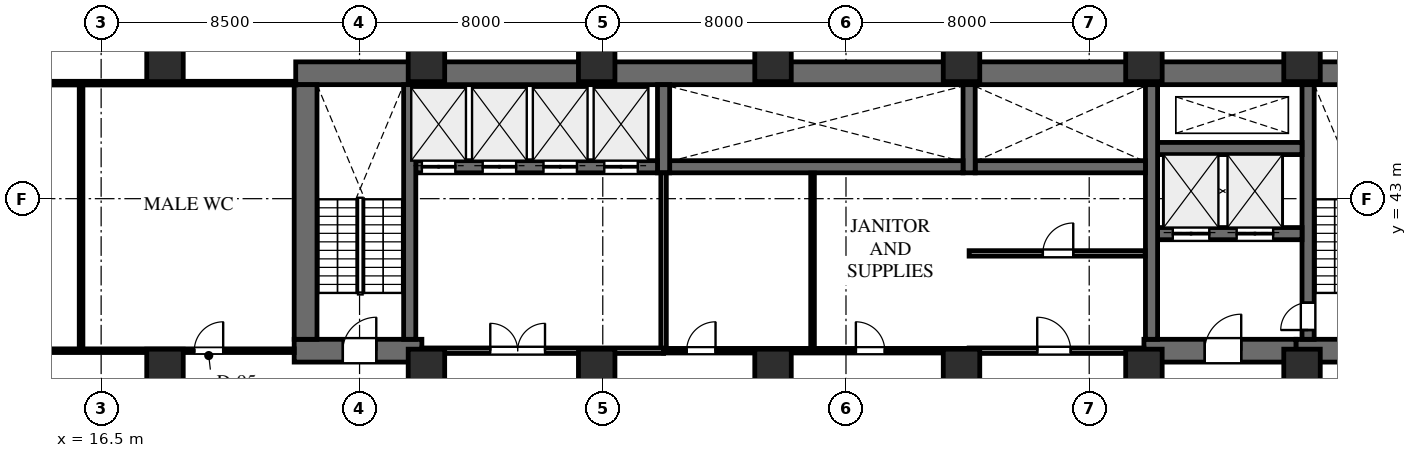
"""IFC4 building model, lengths in metres.
Left out: names, types, materials, properties, quantities, classifications, styles, units other than length and angle.
Written with IfcOpenShell. Run it as: python <this file> out.ifc"""

import sys

from ifc_helpers import new_model, si_unit, direction, frame, frame_2d, origin, origin_2d, place, context, subcontext, project, spatial, rectangle, extrude, element, fill, save


model = new_model("IFC4")
c1 = context("Model", 3, precision=1e-05, world=origin(), true_north=direction((0.0, 1.0)))
c2 = subcontext(c1, "Body", "Model", "MODEL_VIEW")
j1 = project(units=[si_unit("LENGTHUNIT", "METRE"), si_unit("PLANEANGLEUNIT", "RADIAN")], contexts=[c1])
p1 = place(None, origin())
s1 = spatial("IfcSite", under=j1, at=p1, CompositionType="ELEMENT")
p2 = place(p1, origin())
s2 = spatial("IfcBuilding", under=s1, at=p2, CompositionType="ELEMENT")
p3 = place(p2, frame((0.0, 0.0, 61.5)))
s3 = spatial("IfcBuildingStorey", under=s2, at=p3, CompositionType="ELEMENT", Elevation=61.5)
p4 = place(p3, frame((22.9, 47.125, 0.0), z_axis=(0.0, 0.0, 1.0), x_axis=(1.0, 0.0, 0.0)))
e1 = element("IfcWall", 1, at=p4, inside=s3, PredefinedType="SHEAR", context=c2, shape_type="SweptSolid", body=[
    extrude(rectangle(XDim=43.7, YDim=0.75, at=frame_2d((21.85, 0.0))), origin(), (0.0, 0.0, 1.0), 4.0),
])
p5 = place(p3, frame((55.8, 38.0, 0.0), z_axis=(0.0, 0.0, 1.0), x_axis=(1.0, 0.0, 0.0)))
e2 = element("IfcWall", 2, at=p5, inside=s3, PredefinedType="SHEAR", context=c2, shape_type="SweptSolid", body=[
    extrude(rectangle(XDim=10.8, YDim=0.75, at=frame_2d((5.4, 0.0))), origin(), (0.0, 0.0, 1.0), 4.0),
])
p6 = place(p5, frame((1.5, 0.0, 0.0)))
e3 = element("IfcOpeningElement", 3, at=p6, cuts=e2, PredefinedType="OPENING", context=c2, shape_type="SweptSolid", body=[
    extrude(rectangle(XDim=1.1, YDim=2.2, at=frame_2d((0.55, 1.1))), frame((0.0, 0.385, 0.0), z_axis=(0.0, -1.0, 0.0), x_axis=(1.0, 0.0, 0.0)), (0.0, 0.0, 1.0), 0.77),
])
p7 = place(p5, frame((4.82, 0.0, 0.0)))
e4 = element("IfcOpeningElement", 4, at=p7, cuts=e2, PredefinedType="OPENING", context=c2, shape_type="SweptSolid", body=[
    extrude(rectangle(XDim=1.0, YDim=2.15, at=frame_2d((0.5, 1.075))), frame((0.0, 0.385, 0.0), z_axis=(0.0, -1.0, 0.0), x_axis=(1.0, 0.0, 0.0)), (0.0, 0.0, 1.0), 0.77),
])
p8 = place(p5, frame((8.05, 0.0, 0.0)))
e5 = element("IfcOpeningElement", 5, at=p8, cuts=e2, PredefinedType="OPENING", context=c2, shape_type="SweptSolid", body=[
    extrude(rectangle(XDim=1.1, YDim=2.2, at=frame_2d((0.55, 1.1))), frame((0.0, 0.385, 0.0), z_axis=(0.0, -1.0, 0.0), x_axis=(1.0, 0.0, 0.0)), (0.0, 0.0, 1.0), 0.77),
])
p9 = place(p3, frame((56.2, 38.375, 0.0), z_axis=(0.0, 0.0, 1.0), x_axis=(0.0, 1.0, 0.0)))
e6 = element("IfcWall", 6, at=p9, inside=s3, PredefinedType="SHEAR", context=c2, shape_type="SweptSolid", body=[
    extrude(rectangle(XDim=8.375, YDim=0.4, at=frame_2d((4.188, 0.0))), origin(), (0.0, 0.0, 1.0), 4.0),
])
p10 = place(p9, frame((0.305, 0.0, 0.0)))
e7 = element("IfcOpeningElement", 7, at=p10, cuts=e6, PredefinedType="OPENING", context=c2, shape_type="SweptSolid", body=[
    extrude(rectangle(XDim=0.9, YDim=2.15, at=frame_2d((0.45, 1.075))), frame((0.0, 0.21, 0.0), z_axis=(0.0, -1.0, 0.0), x_axis=(1.0, 0.0, 0.0)), (0.0, 0.0, 1.0), 0.42),
])
p11 = place(p3, frame((50.8, 38.0, 0.0), z_axis=(0.0, 0.0, 1.0), x_axis=(1.0, 0.0, 0.0)))
e8 = element("IfcWall", 8, at=p11, inside=s3, PredefinedType="SHEAR", context=c2, shape_type="SweptSolid", body=[
    extrude(rectangle(XDim=5.0, YDim=0.75, at=frame_2d((2.5, 0.0))), origin(), (0.0, 0.0, 1.0), 4.0),
])
p12 = place(p11, frame((2.0, 0.0, 0.0)))
e9 = element("IfcOpeningElement", 9, at=p12, cuts=e8, PredefinedType="OPENING", context=c2, shape_type="SweptSolid", body=[
    extrude(rectangle(XDim=1.2, YDim=2.2, at=frame_2d((0.6, 1.1))), frame((0.0, 0.385, 0.0), z_axis=(0.0, -1.0, 0.0), x_axis=(1.0, 0.0, 0.0)), (0.0, 0.0, 1.0), 0.77),
])
p13 = place(p3, frame((51.25, 41.85, 0.0), z_axis=(0.0, 0.0, 1.0), x_axis=(1.0, 0.0, 0.0)))
e10 = element("IfcWall", 10, at=p13, inside=s3, PredefinedType="SHEAR", context=c2, shape_type="SweptSolid", body=[
    extrude(rectangle(XDim=4.75, YDim=0.4, at=frame_2d((2.375, 0.0))), origin(), (0.0, 0.0, 1.0), 4.0),
])
p14 = place(p13, frame((0.5, 0.0, 0.0)))
e11 = element("IfcOpeningElement", 11, at=p14, cuts=e10, PredefinedType="OPENING", context=c2, shape_type="SweptSolid", body=[
    extrude(rectangle(XDim=1.2, YDim=2.2, at=frame_2d((0.6, 1.1))), frame((0.0, 0.21, 0.0), z_axis=(0.0, -1.0, 0.0), x_axis=(1.0, 0.0, 0.0)), (0.0, 0.0, 1.0), 0.42),
])
p15 = place(p13, frame((2.6, 0.0, 0.0)))
e12 = element("IfcOpeningElement", 12, at=p15, cuts=e10, PredefinedType="OPENING", context=c2, shape_type="SweptSolid", body=[
    extrude(rectangle(XDim=1.2, YDim=2.2, at=frame_2d((0.6, 1.1))), frame((0.0, 0.21, 0.0), z_axis=(0.0, -1.0, 0.0), x_axis=(1.0, 0.0, 0.0)), (0.0, 0.0, 1.0), 0.42),
])
p16 = place(p3, frame((51.25, 44.65, 0.0), z_axis=(0.0, 0.0, 1.0), x_axis=(1.0, 0.0, 0.0)))
e13 = element("IfcWall", 13, at=p16, inside=s3, PredefinedType="SHEAR", context=c2, shape_type="SweptSolid", body=[
    extrude(rectangle(XDim=4.75, YDim=0.4, at=frame_2d((2.375, 0.0))), origin(), (0.0, 0.0, 1.0), 4.0),
])
p17 = place(p3, frame((51.05, 38.375, 0.0), z_axis=(0.0, 0.0, 1.0), x_axis=(0.0, 1.0, 0.0)))
e14 = element("IfcWall", 14, at=p17, inside=s3, PredefinedType="SHEAR", context=c2, shape_type="SweptSolid", body=[
    extrude(rectangle(XDim=8.375, YDim=0.4, at=frame_2d((4.188, 0.0))), origin(), (0.0, 0.0, 1.0), 4.0),
])
p18 = place(p3, frame((45.25, 44.05, 0.0), z_axis=(0.0, 0.0, 1.0), x_axis=(1.0, 0.0, 0.0)))
e15 = element("IfcWall", 15, at=p18, inside=s3, PredefinedType="SHEAR", context=c2, shape_type="SweptSolid", body=[
    extrude(rectangle(XDim=5.6, YDim=0.4, at=frame_2d((2.8, 0.0))), origin(), (0.0, 0.0, 1.0), 4.0),
])
p19 = place(p3, frame((45.05, 43.85, 0.0), z_axis=(0.0, 0.0, 1.0), x_axis=(0.0, 1.0, 0.0)))
e16 = element("IfcWall", 16, at=p19, inside=s3, PredefinedType="SHEAR", context=c2, shape_type="SweptSolid", body=[
    extrude(rectangle(XDim=2.9, YDim=0.4, at=frame_2d((1.45, 0.0))), origin(), (0.0, 0.0, 1.0), 4.0),
])
p20 = place(p3, frame((35.2, 44.05, 0.0), z_axis=(0.0, 0.0, 1.0), x_axis=(1.0, 0.0, 0.0)))
e17 = element("IfcWall", 17, at=p20, inside=s3, PredefinedType="SHEAR", context=c2, shape_type="SweptSolid", body=[
    extrude(rectangle(XDim=9.65, YDim=0.4, at=frame_2d((4.825, 0.0))), origin(), (0.0, 0.0, 1.0), 4.0),
])
p21 = place(p3, frame((35.0, 43.85, 0.0), z_axis=(0.0, 0.0, 1.0), x_axis=(0.0, 1.0, 0.0)))
e18 = element("IfcWall", 18, at=p21, inside=s3, PredefinedType="SHEAR", context=c2, shape_type="SweptSolid", body=[
    extrude(rectangle(XDim=2.9, YDim=0.4, at=frame_2d((1.45, 0.0))), origin(), (0.0, 0.0, 1.0), 4.0),
])
p22 = place(p3, frame((26.85, 44.05, 0.0), z_axis=(0.0, 0.0, 1.0), x_axis=(1.0, 0.0, 0.0)))
e19 = element("IfcWall", 19, at=p22, inside=s3, PredefinedType="SHEAR", context=c2, shape_type="SweptSolid", body=[
    extrude(rectangle(XDim=7.95, YDim=0.4, at=frame_2d((3.975, 0.0))), origin(), (0.0, 0.0, 1.0), 4.0),
])
p23 = place(p22, frame((0.2, 0.0, 0.0)))
e20 = element("IfcOpeningElement", 20, at=p23, cuts=e19, PredefinedType="OPENING", context=c2, shape_type="SweptSolid", body=[
    extrude(rectangle(XDim=1.1, YDim=2.2, at=frame_2d((0.55, 1.1))), frame((0.0, 0.21, 0.0), z_axis=(0.0, -1.0, 0.0), x_axis=(1.0, 0.0, 0.0)), (0.0, 0.0, 1.0), 0.42),
])
p24 = place(p22, frame((2.2, 0.0, 0.0)))
e21 = element("IfcOpeningElement", 21, at=p24, cuts=e19, PredefinedType="OPENING", context=c2, shape_type="SweptSolid", body=[
    extrude(rectangle(XDim=1.1, YDim=2.2, at=frame_2d((0.55, 1.1))), frame((0.0, 0.21, 0.0), z_axis=(0.0, -1.0, 0.0), x_axis=(1.0, 0.0, 0.0)), (0.0, 0.0, 1.0), 0.42),
])
p25 = place(p22, frame((4.2, 0.0, 0.0)))
e22 = element("IfcOpeningElement", 22, at=p25, cuts=e19, PredefinedType="OPENING", context=c2, shape_type="SweptSolid", body=[
    extrude(rectangle(XDim=1.1, YDim=2.2, at=frame_2d((0.55, 1.1))), frame((0.0, 0.21, 0.0), z_axis=(0.0, -1.0, 0.0), x_axis=(1.0, 0.0, 0.0)), (0.0, 0.0, 1.0), 0.42),
])
p26 = place(p22, frame((6.2, 0.0, 0.0)))
e23 = element("IfcOpeningElement", 23, at=p26, cuts=e19, PredefinedType="OPENING", context=c2, shape_type="SweptSolid", body=[
    extrude(rectangle(XDim=1.1, YDim=2.2, at=frame_2d((0.55, 1.1))), frame((0.0, 0.21, 0.0), z_axis=(0.0, -1.0, 0.0), x_axis=(1.0, 0.0, 0.0)), (0.0, 0.0, 1.0), 0.42),
])
p27 = place(p3, frame((22.85, 38.0, 0.0), z_axis=(0.0, 0.0, 1.0), x_axis=(1.0, 0.0, 0.0)))
e24 = element("IfcWall", 24, at=p27, inside=s3, PredefinedType="SHEAR", context=c2, shape_type="SweptSolid", body=[
    extrude(rectangle(XDim=4.2, YDim=0.75, at=frame_2d((2.1, 0.0))), origin(), (0.0, 0.0, 1.0), 4.0),
])
p28 = place(p27, frame((1.6, 0.0, 0.0)))
e25 = element("IfcOpeningElement", 25, at=p28, cuts=e24, PredefinedType="OPENING", context=c2, shape_type="SweptSolid", body=[
    extrude(rectangle(XDim=1.1, YDim=2.2, at=frame_2d((0.55, 1.1))), frame((0.0, 0.385, 0.0), z_axis=(0.0, -1.0, 0.0), x_axis=(1.0, 0.0, 0.0)), (0.0, 0.0, 1.0), 0.77),
])
p29 = place(p3, frame((23.225, 38.375, 0.0), z_axis=(0.0, 0.0, 1.0), x_axis=(0.0, 1.0, 0.0)))
e26 = element("IfcWall", 26, at=p29, inside=s3, PredefinedType="SHEAR", context=c2, shape_type="SweptSolid", body=[
    extrude(rectangle(XDim=8.375, YDim=0.75, at=frame_2d((4.188, 0.0))), origin(), (0.0, 0.0, 1.0), 4.0),
])
p30 = place(p3, frame((26.65, 38.375, 0.0), z_axis=(0.0, 0.0, 1.0), x_axis=(0.0, 1.0, 0.0)))
e27 = element("IfcWall", 27, at=p30, inside=s3, PredefinedType="SHEAR", context=c2, shape_type="SweptSolid", body=[
    extrude(rectangle(XDim=8.375, YDim=0.4, at=frame_2d((4.188, 0.0))), origin(), (0.0, 0.0, 1.0), 4.0),
])
for number, where, z_axis, x_axis in (
    (28, (56.0, 47.55, 0.0), (0.0, 0.0, 1.0), (1.0, 0.0, 0.0)),
    (29, (56.0, 37.35, 0.0), (0.0, 0.0, 1.0), (1.0, 0.0, 0.0)),
    (30, (50.8, 47.55, 0.0), (0.0, 0.0, 1.0), (1.0, 0.0, 0.0)),
    (31, (50.8, 37.35, 0.0), (0.0, 0.0, 1.0), (1.0, 0.0, 0.0)),
    (32, (44.8, 37.35, 0.0), (0.0, 0.0, 1.0), (1.0, 0.0, 0.0)),
    (33, (44.8, 47.55, 0.0), (0.0, 0.0, 1.0), (1.0, 0.0, 0.0)),
    (34, (38.6, 37.35, 0.0), (0.0, 0.0, 1.0), (1.0, 0.0, 0.0)),
    (35, (38.6, 47.55, 0.0), (0.0, 0.0, 1.0), (1.0, 0.0, 0.0)),
    (36, (32.8, 37.35, 0.0), (0.0, 0.0, 1.0), (1.0, 0.0, 0.0)),
    (37, (32.8, 47.55, 0.0), (0.0, 0.0, 1.0), (1.0, 0.0, 0.0)),
    (38, (27.2, 37.35, 0.0), (0.0, 0.0, 1.0), (1.0, 0.0, 0.0)),
    (39, (27.2, 47.55, 0.0), (0.0, 0.0, 1.0), (1.0, 0.0, 0.0)),
    (40, (18.6, 37.35, 0.0), (0.0, 0.0, 1.0), (1.0, 0.0, 0.0)),
    (41, (18.6, 47.55, 0.0), (0.0, 0.0, 1.0), (1.0, 0.0, 0.0)),
):
    element("IfcColumn", number, at=place(p3, frame(where, z_axis=z_axis, x_axis=x_axis)), inside=s3, PredefinedType="COLUMN", context=c2, shape_type="SweptSolid", body=[
        extrude(rectangle(XDim=1.2, YDim=1.4, at=origin_2d()), origin(), (0.0, 0.0, 1.0), 4.0),
    ])
p31 = place(p3, frame((45.05, 38.0, 0.0), z_axis=(0.0, 0.0, 1.0), x_axis=(1.0, 0.0, 0.0)))
e42 = element("IfcWall", 42, at=p31, inside=s3, PredefinedType="STANDARD", context=c2, shape_type="SweptSolid", body=[
    extrude(rectangle(XDim=5.75, YDim=0.18, at=frame_2d((2.875, 0.0))), origin(), (0.0, 0.0, 1.0), 2.813),
])
p32 = place(p31, frame((2.24, 0.0, 0.0)))
e43 = element("IfcOpeningElement", 43, at=p32, cuts=e42, PredefinedType="OPENING", context=c2, shape_type="SweptSolid", body=[
    extrude(rectangle(XDim=1.1, YDim=2.2, at=frame_2d((0.55, 1.1))), frame((0.0, 0.1, 0.0), z_axis=(0.0, -1.0, 0.0), x_axis=(1.0, 0.0, 0.0)), (0.0, 0.0, 1.0), 0.2),
])
p33 = place(p3, frame((45.05, 41.2, 0.0), z_axis=(0.0, 0.0, 1.0), x_axis=(1.0, 0.0, 0.0)))
e44 = element("IfcWall", 44, at=p33, inside=s3, PredefinedType="STANDARD", context=c2, shape_type="SweptSolid", body=[
    extrude(rectangle(XDim=5.792, YDim=0.18, at=frame_2d((2.896, 0.0))), origin(), (0.0, 0.0, 1.0), 2.813),
])
p34 = place(p33, frame((2.425, 0.0, 0.0)))
e45 = element("IfcOpeningElement", 45, at=p34, cuts=e44, PredefinedType="OPENING", context=c2, shape_type="SweptSolid", body=[
    extrude(rectangle(XDim=1.0, YDim=2.15, at=frame_2d((0.5, 1.075))), frame((0.0, 0.1, 0.0), z_axis=(0.0, -1.0, 0.0), x_axis=(1.0, 0.0, 0.0)), (0.0, 0.0, 1.0), 0.2),
])
p35 = place(p3, frame((35.0, 38.0, 0.0), z_axis=(0.0, 0.0, 1.0), x_axis=(0.0, 1.0, 0.0)))
e46 = element("IfcWall", 46, at=p35, inside=s3, PredefinedType="STANDARD", context=c2, shape_type="SweptSolid", body=[
    extrude(rectangle(XDim=5.85, YDim=0.18, at=frame_2d((2.925, 0.0))), origin(), (0.0, 0.0, 1.0), 3.74),
])
p36 = place(p3, frame((27.05, 38.0, 0.0), z_axis=(0.0, 0.0, 1.0), x_axis=(1.0, 0.0, 0.0)))
e47 = element("IfcWall", 47, at=p36, inside=s3, PredefinedType="STANDARD", context=c2, shape_type="SweptSolid", body=[
    extrude(rectangle(XDim=7.95, YDim=0.18, at=frame_2d((3.975, 0.0))), origin(), (0.0, 0.0, 1.0), 2.813),
])
p37 = place(p36, frame((2.25, 0.0, 0.0)))
e48 = element("IfcOpeningElement", 48, at=p37, cuts=e47, PredefinedType="OPENING", context=c2, shape_type="SweptSolid", body=[
    extrude(rectangle(XDim=1.8, YDim=2.2, at=frame_2d((0.9, 1.1))), frame((0.0, 0.1, 0.0), z_axis=(0.0, -1.0, 0.0), x_axis=(1.0, 0.0, 0.0)), (0.0, 0.0, 1.0), 0.2),
])
p38 = place(p3, frame((35.0, 38.0, 0.0), z_axis=(0.0, 0.0, 1.0), x_axis=(1.0, 0.0, 0.0)))
e49 = element("IfcWall", 49, at=p38, inside=s3, PredefinedType="PARTITIONING", context=c2, shape_type="SweptSolid", body=[
    extrude(rectangle(XDim=10.05, YDim=0.15, at=frame_2d((5.025, 0.0))), origin(), (0.0, 0.0, 1.0), 2.813),
])
p39 = place(p38, frame((0.759, 0.0, 0.0)))
e50 = element("IfcOpeningElement", 50, at=p39, cuts=e49, PredefinedType="OPENING", context=c2, shape_type="SweptSolid", body=[
    extrude(rectangle(XDim=0.95, YDim=2.15, at=frame_2d((0.475, 1.075))), frame((0.0, 0.085, 0.0), z_axis=(0.0, -1.0, 0.0), x_axis=(1.0, 0.0, 0.0)), (0.0, 0.0, 1.0), 0.17),
])
p40 = place(p38, frame((6.325, 0.0, 0.0)))
e51 = element("IfcOpeningElement", 51, at=p40, cuts=e49, PredefinedType="OPENING", context=c2, shape_type="SweptSolid", body=[
    extrude(rectangle(XDim=0.95, YDim=2.15, at=frame_2d((0.475, 1.075))), frame((0.0, 0.085, 0.0), z_axis=(0.0, -1.0, 0.0), x_axis=(1.0, 0.0, 0.0)), (0.0, 0.0, 1.0), 0.17),
])
p41 = place(p3, frame((39.9, 38.068, 0.0), z_axis=(0.0, 0.0, 1.0), x_axis=(0.0, 1.0, 0.0)))
e52 = element("IfcWall", 52, at=p41, inside=s3, PredefinedType="PARTITIONING", context=c2, shape_type="SweptSolid", body=[
    extrude(rectangle(XDim=5.774, YDim=0.12, at=frame_2d((2.887, 0.0))), origin(), (0.0, 0.0, 1.0), 3.74),
])
p42 = place(p3, frame((6.22, 38.0, 0.0), z_axis=(0.0, 0.0, 1.0), x_axis=(1.0, 0.0, 0.0)))
e53 = element("IfcWall", 53, at=p42, inside=s3, PredefinedType="PARTITIONING", context=c2, shape_type="SweptSolid", body=[
    extrude(rectangle(XDim=16.63, YDim=0.12, at=frame_2d((8.315, 0.0))), origin(), (0.0, 0.0, 1.0), 2.813),
])
p43 = place(p42, frame((0.424, 0.0, 0.0)))
e54 = element("IfcOpeningElement", 54, at=p43, cuts=e53, PredefinedType="OPENING", context=c2, shape_type="SweptSolid", body=[
    extrude(rectangle(XDim=0.95, YDim=2.15, at=frame_2d((0.475, 1.075))), frame((0.0, 0.07, 0.0), z_axis=(0.0, -1.0, 0.0), x_axis=(1.0, 0.0, 0.0)), (0.0, 0.0, 1.0), 0.14),
])
p44 = place(p42, frame((5.444, 0.0, 0.0)))
e55 = element("IfcOpeningElement", 55, at=p44, cuts=e53, PredefinedType="OPENING", context=c2, shape_type="SweptSolid", body=[
    extrude(rectangle(XDim=0.95, YDim=2.15, at=frame_2d((0.475, 1.075))), frame((0.0, 0.07, 0.0), z_axis=(0.0, -1.0, 0.0), x_axis=(1.0, 0.0, 0.0)), (0.0, 0.0, 1.0), 0.14),
])
p45 = place(p42, frame((13.344, 0.0, 0.0)))
e56 = element("IfcOpeningElement", 56, at=p45, cuts=e53, PredefinedType="OPENING", context=c2, shape_type="SweptSolid", body=[
    extrude(rectangle(XDim=0.95, YDim=2.15, at=frame_2d((0.475, 1.075))), frame((0.0, 0.07, 0.0), z_axis=(0.0, -1.0, 0.0), x_axis=(1.0, 0.0, 0.0)), (0.0, 0.0, 1.0), 0.14),
])
p46 = place(p3, frame((6.22, 46.8, 0.0), z_axis=(0.0, 0.0, 1.0), x_axis=(1.0, 0.0, 0.0)))
e57 = element("IfcWall", 57, at=p46, inside=s3, PredefinedType="PARTITIONING", context=c2, shape_type="SweptSolid", body=[
    extrude(rectangle(XDim=16.68, YDim=0.12, at=frame_2d((8.34, 0.0))), origin(), (0.0, 0.0, 1.0), 2.813),
])
p47 = place(p3, frame((15.84, 38.068, 0.0), z_axis=(0.0, 0.0, 1.0), x_axis=(0.0, 1.0, 0.0)))
e58 = element("IfcWall", 58, at=p47, inside=s3, PredefinedType="PARTITIONING", context=c2, shape_type="SweptSolid", body=[
    extrude(rectangle(XDim=8.664, YDim=0.12, at=frame_2d((4.332, 0.0))), origin(), (0.0, 0.0, 1.0), 3.74),
])
p48 = place(p12, origin())
e59 = element("IfcDoor", 59, at=p48, inside=s3, OperationType="SINGLE_SWING_RIGHT", PredefinedType="DOOR", context=c2, shape_type="SweptSolid", body=[
    extrude(rectangle(XDim=1.2, YDim=2.2, at=frame_2d((0.6, 1.1))), frame((0.0, 0.025, 0.0), z_axis=(0.0, -1.0, 0.0), x_axis=(1.0, 0.0, 0.0)), (0.0, 0.0, 1.0), 0.05),
])
fill(e9, e59)
p49 = place(p10, origin())
e60 = element("IfcDoor", 60, at=p49, inside=s3, OperationType="SINGLE_SWING_LEFT", PredefinedType="DOOR", context=c2, shape_type="SweptSolid", body=[
    extrude(rectangle(XDim=0.9, YDim=2.15, at=frame_2d((0.45, 1.075))), frame((0.0, 0.025, 0.0), z_axis=(0.0, -1.0, 0.0), x_axis=(1.0, 0.0, 0.0)), (0.0, 0.0, 1.0), 0.05),
])
fill(e7, e60)
p50 = place(p28, origin())
e61 = element("IfcDoor", 61, at=p50, inside=s3, OperationType="SINGLE_SWING_RIGHT", PredefinedType="DOOR", context=c2, shape_type="SweptSolid", body=[
    extrude(rectangle(XDim=1.1, YDim=2.2, at=frame_2d((0.55, 1.1))), frame((0.0, 0.025, 0.0), z_axis=(0.0, -1.0, 0.0), x_axis=(1.0, 0.0, 0.0)), (0.0, 0.0, 1.0), 0.05),
])
fill(e25, e61)
p51 = place(p23, origin())
e62 = element("IfcDoor", 62, at=p51, inside=s3, OperationType="DOUBLE_DOOR_SLIDING", PredefinedType="DOOR", context=c2, shape_type="SweptSolid", body=[
    extrude(rectangle(XDim=1.1, YDim=2.2, at=frame_2d((0.55, 1.1))), frame((0.0, 0.025, 0.0), z_axis=(0.0, -1.0, 0.0), x_axis=(1.0, 0.0, 0.0)), (0.0, 0.0, 1.0), 0.05),
])
fill(e20, e62)
p52 = place(p24, origin())
e63 = element("IfcDoor", 63, at=p52, inside=s3, OperationType="DOUBLE_DOOR_SLIDING", PredefinedType="DOOR", context=c2, shape_type="SweptSolid", body=[
    extrude(rectangle(XDim=1.1, YDim=2.2, at=frame_2d((0.55, 1.1))), frame((0.0, 0.025, 0.0), z_axis=(0.0, -1.0, 0.0), x_axis=(1.0, 0.0, 0.0)), (0.0, 0.0, 1.0), 0.05),
])
fill(e21, e63)
p53 = place(p25, origin())
e64 = element("IfcDoor", 64, at=p53, inside=s3, OperationType="DOUBLE_DOOR_SLIDING", PredefinedType="DOOR", context=c2, shape_type="SweptSolid", body=[
    extrude(rectangle(XDim=1.1, YDim=2.2, at=frame_2d((0.55, 1.1))), frame((0.0, 0.025, 0.0), z_axis=(0.0, -1.0, 0.0), x_axis=(1.0, 0.0, 0.0)), (0.0, 0.0, 1.0), 0.05),
])
fill(e22, e64)
p54 = place(p26, origin())
e65 = element("IfcDoor", 65, at=p54, inside=s3, OperationType="DOUBLE_DOOR_SLIDING", PredefinedType="DOOR", context=c2, shape_type="SweptSolid", body=[
    extrude(rectangle(XDim=1.1, YDim=2.2, at=frame_2d((0.55, 1.1))), frame((0.0, 0.025, 0.0), z_axis=(0.0, -1.0, 0.0), x_axis=(1.0, 0.0, 0.0)), (0.0, 0.0, 1.0), 0.05),
])
fill(e23, e65)
p55 = place(p14, origin())
e66 = element("IfcDoor", 66, at=p55, inside=s3, OperationType="DOUBLE_DOOR_SLIDING", PredefinedType="DOOR", context=c2, shape_type="SweptSolid", body=[
    extrude(rectangle(XDim=1.2, YDim=2.2, at=frame_2d((0.6, 1.1))), frame((0.0, 0.025, 0.0), z_axis=(0.0, -1.0, 0.0), x_axis=(1.0, 0.0, 0.0)), (0.0, 0.0, 1.0), 0.05),
])
fill(e11, e66)
p56 = place(p15, origin())
e67 = element("IfcDoor", 67, at=p56, inside=s3, OperationType="DOUBLE_DOOR_SLIDING", PredefinedType="DOOR", context=c2, shape_type="SweptSolid", body=[
    extrude(rectangle(XDim=1.2, YDim=2.2, at=frame_2d((0.6, 1.1))), frame((0.0, 0.025, 0.0), z_axis=(0.0, -1.0, 0.0), x_axis=(1.0, 0.0, 0.0)), (0.0, 0.0, 1.0), 0.05),
])
fill(e12, e67)
p57 = place(p34, origin())
e68 = element("IfcDoor", 68, at=p57, inside=s3, OperationType="SINGLE_SWING_RIGHT", PredefinedType="DOOR", context=c2, shape_type="SweptSolid", body=[
    extrude(rectangle(XDim=1.0, YDim=2.15, at=frame_2d((0.5, 1.075))), frame((0.0, 0.025, 0.0), z_axis=(0.0, -1.0, 0.0), x_axis=(1.0, 0.0, 0.0)), (0.0, 0.0, 1.0), 0.05),
])
fill(e45, e68)
p58 = place(p32, origin())
e69 = element("IfcDoor", 69, at=p58, inside=s3, OperationType="SINGLE_SWING_LEFT", PredefinedType="DOOR", context=c2, shape_type="SweptSolid", body=[
    extrude(rectangle(XDim=1.1, YDim=2.2, at=frame_2d((0.55, 1.1))), frame((0.0, 0.025, 0.0), z_axis=(0.0, -1.0, 0.0), x_axis=(1.0, 0.0, 0.0)), (0.0, 0.0, 1.0), 0.05),
])
fill(e43, e69)
p59 = place(p37, origin())
e70 = element("IfcDoor", 70, at=p59, inside=s3, OperationType="DOUBLE_DOOR_SINGLE_SWING", PredefinedType="DOOR", context=c2, shape_type="SweptSolid", body=[
    extrude(rectangle(XDim=1.8, YDim=2.2, at=frame_2d((0.9, 1.1))), frame((0.0, 0.025, 0.0), z_axis=(0.0, -1.0, 0.0), x_axis=(1.0, 0.0, 0.0)), (0.0, 0.0, 1.0), 0.05),
])
fill(e48, e70)
p60 = place(p39, origin())
e71 = element("IfcDoor", 71, at=p60, inside=s3, OperationType="SINGLE_SWING_RIGHT", PredefinedType="DOOR", context=c2, shape_type="SweptSolid", body=[
    extrude(rectangle(XDim=0.95, YDim=2.15, at=frame_2d((0.475, 1.075))), frame((0.0, 0.025, 0.0), z_axis=(0.0, -1.0, 0.0), x_axis=(1.0, 0.0, 0.0)), (0.0, 0.0, 1.0), 0.05),
])
fill(e50, e71)
p61 = place(p40, origin())
e72 = element("IfcDoor", 72, at=p61, inside=s3, OperationType="SINGLE_SWING_LEFT", PredefinedType="DOOR", context=c2, shape_type="SweptSolid", body=[
    extrude(rectangle(XDim=0.95, YDim=2.15, at=frame_2d((0.475, 1.075))), frame((0.0, 0.025, 0.0), z_axis=(0.0, -1.0, 0.0), x_axis=(1.0, 0.0, 0.0)), (0.0, 0.0, 1.0), 0.05),
])
fill(e51, e72)
p62 = place(p45, origin())
e73 = element("IfcDoor", 73, at=p62, inside=s3, OperationType="SINGLE_SWING_RIGHT", PredefinedType="DOOR", context=c2, shape_type="SweptSolid", body=[
    extrude(rectangle(XDim=0.95, YDim=2.15, at=frame_2d((0.475, 1.075))), frame((0.0, 0.025, 0.0), z_axis=(0.0, -1.0, 0.0), x_axis=(1.0, 0.0, 0.0)), (0.0, 0.0, 1.0), 0.05),
])
fill(e56, e73)
save(model, sys.argv[1])
